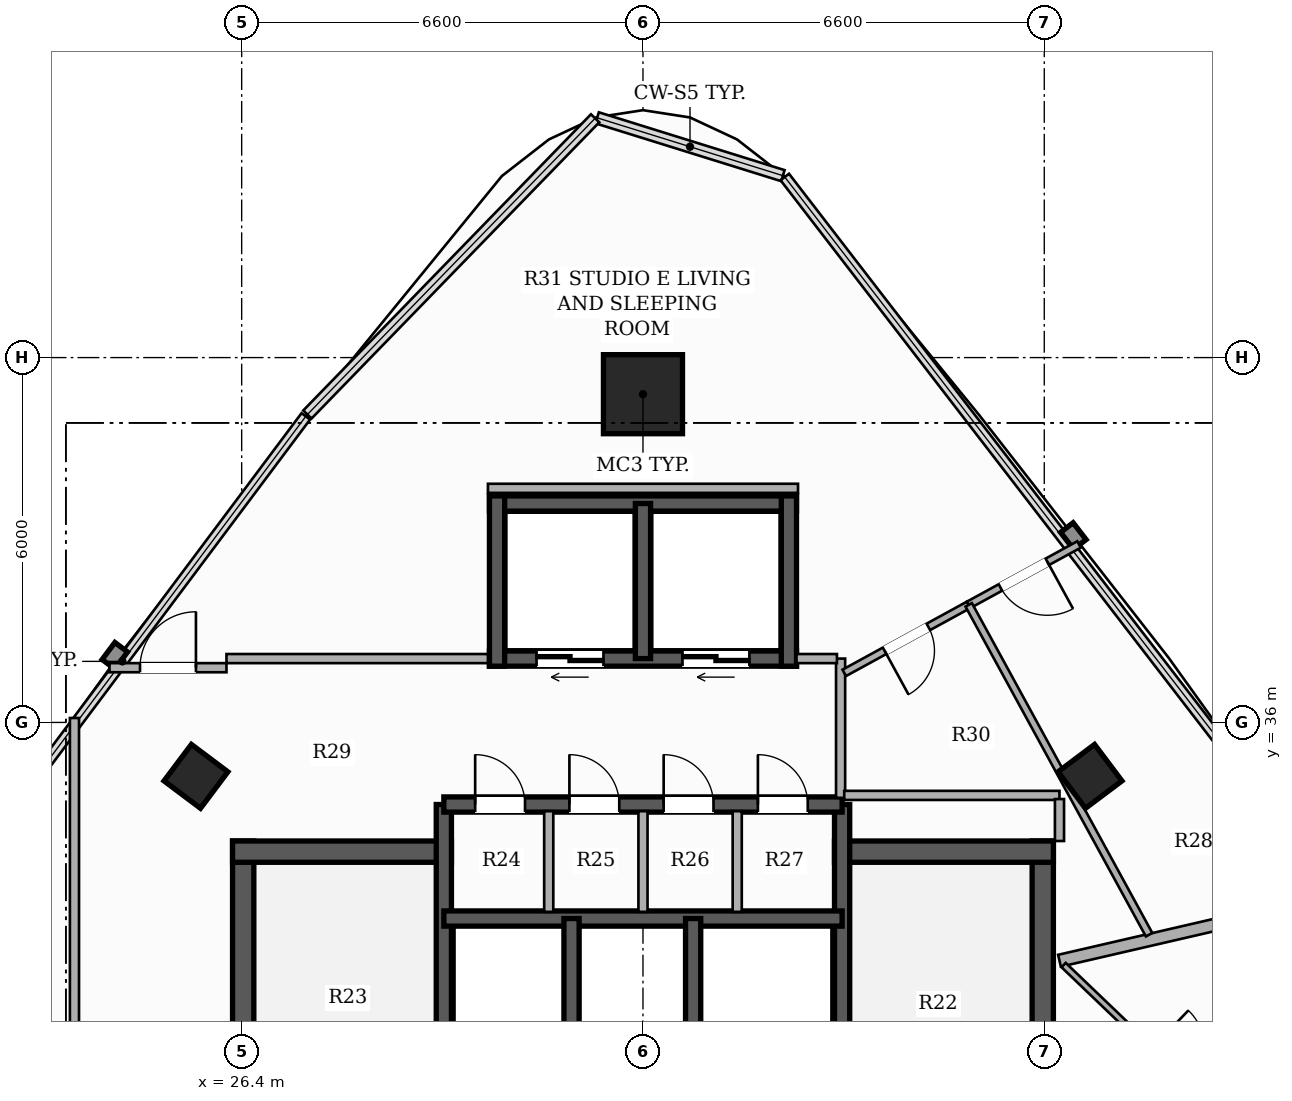
"""IFC4 building model, lengths in metres.
Left out: names, types, materials, properties, quantities, classifications, styles, units other than length and angle.
Written with IfcOpenShell. Run it as: python <this file> out.ifc"""

import sys

from ifc_helpers import new_model, si_unit, direction, frame, frame_2d, origin, origin_2d, place, context, subcontext, project, spatial, rectangle, hollow_rectangle, extrude, element, fill, save


model = new_model("IFC4")
c1 = context("Model", 3, precision=1e-05, world=origin(), true_north=direction((0.0, 1.0)))
c2 = subcontext(c1, "Body", "Model", "MODEL_VIEW")
j1 = project(units=[si_unit("LENGTHUNIT", "METRE"), si_unit("PLANEANGLEUNIT", "RADIAN")], contexts=[c1])
p1 = place(None, origin())
s1 = spatial("IfcSite", under=j1, at=p1, CompositionType="ELEMENT")
p2 = place(p1, origin())
s2 = spatial("IfcBuilding", under=s1, at=p2, CompositionType="ELEMENT")
p3 = place(p2, frame((0.0, 0.0, 216.2)))
s3 = spatial("IfcBuildingStorey", under=s2, at=p3, CompositionType="ELEMENT", Elevation=216.2)
p4 = place(p3, frame((26.425, 26.55, 0.0), z_axis=(0.0, 0.0, 1.0), x_axis=(0.0, 1.0, 0.0)))
e1 = element("IfcWall", 1, at=p4, inside=s3, PredefinedType="SHEAR", context=c2, shape_type="SweptSolid", body=[
    extrude(rectangle(XDim=7.5, YDim=0.35, at=frame_2d((3.75, 0.0))), origin(), (0.0, 0.0, 1.0), 3.3),
])
p5 = place(p3, frame((26.25, 33.875, 0.0), z_axis=(0.0, 0.0, 1.0), x_axis=(1.0, 0.0, 0.0)))
e2 = element("IfcWall", 2, at=p5, inside=s3, PredefinedType="SHEAR", context=c2, shape_type="SweptSolid", body=[
    extrude(rectangle(XDim=3.6, YDim=0.35, at=frame_2d((1.8, 0.0))), origin(), (0.0, 0.0, 1.0), 3.3),
])
p6 = place(p3, frame((39.575, 26.55, 0.0), z_axis=(0.0, 0.0, 1.0), x_axis=(0.0, 1.0, 0.0)))
e3 = element("IfcWall", 3, at=p6, inside=s3, PredefinedType="SHEAR", context=c2, shape_type="SweptSolid", body=[
    extrude(rectangle(XDim=7.5, YDim=0.35, at=frame_2d((3.75, 0.0))), origin(), (0.0, 0.0, 1.0), 3.3),
])
p7 = place(p3, frame((36.15, 33.875, 0.0), z_axis=(0.0, 0.0, 1.0), x_axis=(1.0, 0.0, 0.0)))
e4 = element("IfcWall", 4, at=p7, inside=s3, PredefinedType="SHEAR", context=c2, shape_type="SweptSolid", body=[
    extrude(rectangle(XDim=3.6, YDim=0.35, at=frame_2d((1.8, 0.0))), origin(), (0.0, 0.0, 1.0), 3.3),
])
p8 = place(p3, frame((29.725, 26.55, 0.0), z_axis=(0.0, 0.0, 1.0), x_axis=(0.0, 1.0, 0.0)))
e5 = element("IfcWall", 5, at=p8, inside=s3, PredefinedType="SHEAR", context=c2, shape_type="SweptSolid", body=[
    extrude(rectangle(XDim=8.1, YDim=0.25, at=frame_2d((4.05, 0.0))), origin(), (0.0, 0.0, 1.0), 3.3),
])
p9 = place(p8, frame((0.6, 0.0, 0.0)))
e6 = element("IfcOpeningElement", 6, at=p9, cuts=e5, PredefinedType="OPENING", context=c2, shape_type="SweptSolid", body=[
    extrude(rectangle(XDim=1.05, YDim=2.15, at=frame_2d((0.525, 1.075))), frame((0.0, 0.135, 0.0), z_axis=(0.0, -1.0, 0.0), x_axis=(1.0, 0.0, 0.0)), (0.0, 0.0, 1.0), 0.27),
])
p10 = place(p3, frame((36.275, 26.55, 0.0), z_axis=(0.0, 0.0, 1.0), x_axis=(0.0, 1.0, 0.0)))
e7 = element("IfcWall", 7, at=p10, inside=s3, PredefinedType="SHEAR", context=c2, shape_type="SweptSolid", body=[
    extrude(rectangle(XDim=8.1, YDim=0.25, at=frame_2d((4.05, 0.0))), origin(), (0.0, 0.0, 1.0), 3.3),
])
p11 = place(p10, frame((0.6, 0.0, 0.0)))
e8 = element("IfcOpeningElement", 8, at=p11, cuts=e7, PredefinedType="OPENING", context=c2, shape_type="SweptSolid", body=[
    extrude(rectangle(XDim=1.05, YDim=2.15, at=frame_2d((0.525, 1.075))), frame((0.0, 0.135, 0.0), z_axis=(0.0, -1.0, 0.0), x_axis=(1.0, 0.0, 0.0)), (0.0, 0.0, 1.0), 0.27),
])
p12 = place(p3, frame((29.725, 32.775, 0.0), z_axis=(0.0, 0.0, 1.0), x_axis=(1.0, 0.0, 0.0)))
e9 = element("IfcWall", 9, at=p12, inside=s3, PredefinedType="SHEAR", context=c2, shape_type="SweptSolid", body=[
    extrude(rectangle(XDim=6.55, YDim=0.25, at=frame_2d((3.275, 0.0))), origin(), (0.0, 0.0, 1.0), 3.3),
])
for number, where, z_axis, x_axis in (
    (10, (31.825, 29.875, 0.0), (0.0, 0.0, 1.0), (0.0, 1.0, 0.0)),
    (11, (33.825, 29.875, 0.0), (0.0, 0.0, 1.0), (0.0, 1.0, 0.0)),
):
    element("IfcWall", number, at=place(p3, frame(where, z_axis=z_axis, x_axis=x_axis)), inside=s3, PredefinedType="SHEAR", context=c2, shape_type="SweptSolid", body=[
        extrude(rectangle(XDim=2.9, YDim=0.25, at=frame_2d((1.45, 0.0))), origin(), (0.0, 0.0, 1.0), 3.3),
    ])
p13 = place(p3, frame((29.725, 34.65, 0.0), z_axis=(0.0, 0.0, 1.0), x_axis=(1.0, 0.0, 0.0)))
e12 = element("IfcWall", 12, at=p13, inside=s3, PredefinedType="SHEAR", context=c2, shape_type="SweptSolid", body=[
    extrude(rectangle(XDim=6.55, YDim=0.25, at=frame_2d((3.275, 0.0))), origin(), (0.0, 0.0, 1.0), 3.3),
])
p14 = place(p13, frame((0.515, 0.0, 0.0)))
e13 = element("IfcOpeningElement", 13, at=p14, cuts=e12, PredefinedType="OPENING", context=c2, shape_type="SweptSolid", body=[
    extrude(rectangle(XDim=0.82, YDim=2.1, at=frame_2d((0.41, 1.05))), frame((0.0, 0.135, 0.0), z_axis=(0.0, -1.0, 0.0), x_axis=(1.0, 0.0, 0.0)), (0.0, 0.0, 1.0), 0.27),
])
p15 = place(p13, frame((2.065, 0.0, 0.0)))
e14 = element("IfcOpeningElement", 14, at=p15, cuts=e12, PredefinedType="OPENING", context=c2, shape_type="SweptSolid", body=[
    extrude(rectangle(XDim=0.82, YDim=2.1, at=frame_2d((0.41, 1.05))), frame((0.0, 0.135, 0.0), z_axis=(0.0, -1.0, 0.0), x_axis=(1.0, 0.0, 0.0)), (0.0, 0.0, 1.0), 0.27),
])
p16 = place(p13, frame((3.615, 0.0, 0.0)))
e15 = element("IfcOpeningElement", 15, at=p16, cuts=e12, PredefinedType="OPENING", context=c2, shape_type="SweptSolid", body=[
    extrude(rectangle(XDim=0.82, YDim=2.1, at=frame_2d((0.41, 1.05))), frame((0.0, 0.135, 0.0), z_axis=(0.0, -1.0, 0.0), x_axis=(1.0, 0.0, 0.0)), (0.0, 0.0, 1.0), 0.27),
])
p17 = place(p13, frame((5.165, 0.0, 0.0)))
e16 = element("IfcOpeningElement", 16, at=p17, cuts=e12, PredefinedType="OPENING", context=c2, shape_type="SweptSolid", body=[
    extrude(rectangle(XDim=0.82, YDim=2.1, at=frame_2d((0.41, 1.05))), frame((0.0, 0.135, 0.0), z_axis=(0.0, -1.0, 0.0), x_axis=(1.0, 0.0, 0.0)), (0.0, 0.0, 1.0), 0.27),
])
p18 = place(p3, frame((35.525, 37.05, 0.0), z_axis=(0.0, 0.0, 1.0), x_axis=(-1.0, 0.0, 0.0)))
e17 = element("IfcWall", 17, at=p18, inside=s3, PredefinedType="SHEAR", context=c2, shape_type="SweptSolid", body=[
    extrude(rectangle(XDim=5.05, YDim=0.25, at=frame_2d((2.525, 0.0))), origin(), (0.0, 0.0, 1.0), 3.3),
])
p19 = place(p18, frame((3.175, 0.0, 0.0)))
e18 = element("IfcOpeningElement", 18, at=p19, cuts=e17, PredefinedType="OPENING", context=c2, shape_type="SweptSolid", body=[
    extrude(rectangle(XDim=1.1, YDim=2.2, at=frame_2d((0.55, 1.1))), frame((0.0, 0.135, 0.0), z_axis=(0.0, -1.0, 0.0), x_axis=(1.0, 0.0, 0.0)), (0.0, 0.0, 1.0), 0.27),
])
p20 = place(p18, frame((0.775, 0.0, 0.0)))
e19 = element("IfcOpeningElement", 19, at=p20, cuts=e17, PredefinedType="OPENING", context=c2, shape_type="SweptSolid", body=[
    extrude(rectangle(XDim=1.1, YDim=2.2, at=frame_2d((0.55, 1.1))), frame((0.0, 0.135, 0.0), z_axis=(0.0, -1.0, 0.0), x_axis=(1.0, 0.0, 0.0)), (0.0, 0.0, 1.0), 0.27),
])
p21 = place(p3, frame((30.475, 39.6, 0.0), z_axis=(0.0, 0.0, 1.0), x_axis=(1.0, 0.0, 0.0)))
e20 = element("IfcWall", 20, at=p21, inside=s3, PredefinedType="SHEAR", context=c2, shape_type="SweptSolid", body=[
    extrude(rectangle(XDim=5.05, YDim=0.25, at=frame_2d((2.525, 0.0))), origin(), (0.0, 0.0, 1.0), 3.3),
])
for number, where, z_axis, x_axis in (
    (21, (30.6, 36.925, 0.0), (0.0, 0.0, 1.0), (0.0, 1.0, 0.0)),
    (22, (35.4, 36.925, 0.0), (0.0, 0.0, 1.0), (0.0, 1.0, 0.0)),
):
    element("IfcWall", number, at=place(p3, frame(where, z_axis=z_axis, x_axis=x_axis)), inside=s3, PredefinedType="SHEAR", context=c2, shape_type="SweptSolid", body=[
        extrude(rectangle(XDim=2.8, YDim=0.25, at=frame_2d((1.4, 0.0))), origin(), (0.0, 0.0, 1.0), 3.3),
    ])
p22 = place(p3, frame((33.0, 37.05, 0.0), z_axis=(0.0, 0.0, 1.0), x_axis=(0.0, 1.0, 0.0)))
e23 = element("IfcWall", 23, at=p22, inside=s3, PredefinedType="SHEAR", context=c2, shape_type="SweptSolid", body=[
    extrude(rectangle(XDim=2.55, YDim=0.25, at=frame_2d((1.275, 0.0))), origin(), (0.0, 0.0, 1.0), 3.3),
])
p23 = place(p3, frame((33.0, 41.398, 0.0), z_axis=(0.0, 0.0, 1.0), x_axis=(1.0, 0.0, 0.0)))
e24 = element("IfcColumn", 24, at=p23, inside=s3, PredefinedType="COLUMN", context=c2, shape_type="SweptSolid", body=[
    extrude(hollow_rectangle(XDim=1.3, YDim=1.3, WallThickness=0.04, at=origin_2d()), origin(), (0.0, 0.0, 1.0), 3.3),
])
for number, where, z_axis, x_axis in (
    (25, (25.648, 35.113, 0.0), (0.0, 0.0, 1.0), (0.6, 0.8, 0.0)),
    (26, (40.352, 35.113, 0.0), (0.0, 0.0, 1.0), (-0.6, 0.8, 0.0)),
):
    element("IfcColumn", number, at=place(p3, frame(where, z_axis=z_axis, x_axis=x_axis)), inside=s3, PredefinedType="COLUMN", context=c2, shape_type="SweptSolid", body=[
        extrude(hollow_rectangle(XDim=0.75, YDim=0.75, WallThickness=0.025, at=origin_2d()), origin(), (0.0, 0.0, 1.0), 3.3),
    ])
p24 = place(p3, frame((36.25, 34.76, 0.0), z_axis=(0.0, 0.0, 1.0), x_axis=(0.0, 1.0, 0.0)))
e27 = element("IfcWall", 27, at=p24, inside=s3, PredefinedType="PARTITIONING", context=c2, shape_type="SweptSolid", body=[
    extrude(rectangle(XDim=2.29, YDim=0.15, at=frame_2d((1.145, 0.0))), origin(), (0.0, 0.0, 1.0), 2.425),
])
p25 = place(p3, frame((35.525, 37.05, 0.0), z_axis=(0.0, 0.0, 1.0), x_axis=(1.0, 0.0, 0.0)))
e28 = element("IfcWall", 28, at=p25, inside=s3, PredefinedType="PARTITIONING", context=c2, shape_type="SweptSolid", body=[
    extrude(rectangle(XDim=0.665, YDim=0.15, at=frame_2d((0.333, 0.0))), origin(), (0.0, 0.0, 1.0), 2.425),
])
for number, where, z_axis, x_axis in (
    (29, (31.45, 32.885, 0.0), (0.0, 0.0, 1.0), (0.0, 1.0, 0.0)),
    (30, (33.0, 32.885, 0.0), (0.0, 0.0, 1.0), (0.0, 1.0, 0.0)),
    (31, (34.55, 32.885, 0.0), (0.0, 0.0, 1.0), (0.0, 1.0, 0.0)),
):
    element("IfcWall", number, at=place(p3, frame(where, z_axis=z_axis, x_axis=x_axis)), inside=s3, PredefinedType="PARTITIONING", context=c2, shape_type="SweptSolid", body=[
        extrude(rectangle(XDim=1.655, YDim=0.15, at=frame_2d((0.828, 0.0))), origin(), (0.0, 0.0, 1.0), 3.06),
    ])
p26 = place(p3, frame((23.65, 23.91, 0.0), z_axis=(0.0, 0.0, 1.0), x_axis=(0.0, 1.0, 0.0)))
e32 = element("IfcWall", 32, at=p26, inside=s3, PredefinedType="PARTITIONING", context=c2, shape_type="SweptSolid", body=[
    extrude(rectangle(XDim=12.163, YDim=0.15, at=frame_2d((6.082, 0.0))), origin(), (0.0, 0.0, 1.0), 2.492),
])
p27 = place(p26, frame((5.622, 0.0, 0.0)))
e33 = element("IfcOpeningElement", 33, at=p27, cuts=e32, PredefinedType="OPENING", context=c2, shape_type="SweptSolid", body=[
    extrude(rectangle(XDim=0.92, YDim=2.15, at=frame_2d((0.46, 1.075))), frame((0.0, 0.085, 0.0), z_axis=(0.0, -1.0, 0.0), x_axis=(1.0, 0.0, 0.0)), (0.0, 0.0, 1.0), 0.17),
])
p28 = place(p3, frame((24.226, 36.9, 0.0), z_axis=(0.0, 0.0, 1.0), x_axis=(1.0, 0.0, 0.0)))
e34 = element("IfcWall", 34, at=p28, inside=s3, PredefinedType="PARTITIONING", context=c2, shape_type="SweptSolid", body=[
    extrude(rectangle(XDim=1.924, YDim=0.15, at=frame_2d((0.962, 0.0))), origin(), (0.0, 0.0, 1.0), 2.619),
])
p29 = place(p28, frame((0.502, 0.0, 0.0)))
e35 = element("IfcOpeningElement", 35, at=p29, cuts=e34, PredefinedType="OPENING", context=c2, shape_type="SweptSolid", body=[
    extrude(rectangle(XDim=0.92, YDim=2.15, at=frame_2d((0.46, 1.075))), frame((0.0, 0.085, 0.0), z_axis=(0.0, -1.0, 0.0), x_axis=(1.0, 0.0, 0.0)), (0.0, 0.0, 1.0), 0.17),
])
p30 = place(p3, frame((26.15, 37.05, 0.0), z_axis=(0.0, 0.0, 1.0), x_axis=(1.0, 0.0, 0.0)))
e36 = element("IfcWall", 36, at=p30, inside=s3, PredefinedType="PARTITIONING", context=c2, shape_type="SweptSolid", body=[
    extrude(rectangle(XDim=4.3, YDim=0.15, at=frame_2d((2.15, 0.0))), origin(), (0.0, 0.0, 1.0), 2.425),
])
p31 = place(p3, frame((30.45, 39.85, 0.0), z_axis=(0.0, 0.0, 1.0), x_axis=(1.0, 0.0, 0.0)))
e37 = element("IfcWall", 37, at=p31, inside=s3, PredefinedType="PARTITIONING", context=c2, shape_type="SweptSolid", body=[
    extrude(rectangle(XDim=5.1, YDim=0.15, at=frame_2d((2.55, 0.0))), origin(), (0.0, 0.0, 1.0), 2.492),
])
p32 = place(p3, frame((36.31, 34.8, 0.0), z_axis=(0.0, 0.0, 1.0), x_axis=(1.0, 0.0, 0.0)))
e38 = element("IfcWall", 38, at=p32, inside=s3, PredefinedType="PARTITIONING", context=c2, shape_type="SweptSolid", body=[
    extrude(rectangle(XDim=3.54, YDim=0.15, at=frame_2d((1.77, 0.0))), origin(), (0.0, 0.0, 1.0), 2.425),
])
p33 = place(p3, frame((39.85, 34.74, 0.0), z_axis=(0.0, 0.0, 1.0), x_axis=(0.0, -1.0, 0.0)))
e39 = element("IfcWall", 39, at=p33, inside=s3, PredefinedType="PARTITIONING", context=c2, shape_type="SweptSolid", body=[
    extrude(rectangle(XDim=0.69, YDim=0.15, at=frame_2d((0.345, 0.0))), origin(), (0.0, 0.0, 1.0), 2.773),
])
p34 = place(p3, frame((39.85, 32.081, 0.0), z_axis=(0.0, 0.0, 1.0), x_axis=(0.974339670333, 0.225082666628, 0.0)))
e40 = element("IfcWall", 40, at=p34, inside=s3, PredefinedType="PARTITIONING", context=c2, shape_type="SweptSolid", body=[
    extrude(rectangle(XDim=4.714, YDim=0.2, at=frame_2d((2.357, 0.0))), origin(), (0.0, 0.0, 1.0), 2.492),
])
p35 = place(p3, frame((39.918, 32.01, 0.0), z_axis=(0.0, 0.0, 1.0), x_axis=(0.722311203135, -0.691568164266, 0.0)))
e41 = element("IfcWall", 41, at=p35, inside=s3, PredefinedType="PARTITIONING", context=c2, shape_type="SweptSolid", body=[
    extrude(rectangle(XDim=4.876, YDim=0.1, at=frame_2d((2.438, 0.0))), origin(), (0.0, 0.0, 1.0), 2.773),
])
p36 = place(p35, frame((1.998, 0.0, 0.0)))
e42 = element("IfcOpeningElement", 42, at=p36, cuts=e41, PredefinedType="OPENING", context=c2, shape_type="SweptSolid", body=[
    extrude(rectangle(XDim=0.88, YDim=2.1, at=frame_2d((0.44, 1.05))), frame((0.0, 0.06, 0.0), z_axis=(0.0, -1.0, 0.0), x_axis=(1.0, 0.0, 0.0)), (0.0, 0.0, 1.0), 0.12),
])
p37 = place(p3, frame((38.357, 37.934, 0.0), z_axis=(0.0, 0.0, 1.0), x_axis=(-0.877415192217, -0.479731779714, 0.0)))
e43 = element("IfcWall", 43, at=p37, inside=s3, PredefinedType="PARTITIONING", context=c2, shape_type="SweptSolid", body=[
    extrude(rectangle(XDim=2.333, YDim=0.12, at=frame_2d((1.167, 0.0))), origin(), (0.0, 0.0, 1.0), 2.425),
])
p38 = place(p37, frame((0.756, 0.0, 0.0)))
e44 = element("IfcOpeningElement", 44, at=p38, cuts=e43, PredefinedType="OPENING", context=c2, shape_type="SweptSolid", body=[
    extrude(rectangle(XDim=0.82, YDim=2.1, at=frame_2d((0.41, 1.05))), frame((0.0, 0.07, 0.0), z_axis=(0.0, -1.0, 0.0), x_axis=(1.0, 0.0, 0.0)), (0.0, 0.0, 1.0), 0.14),
])
p39 = place(p3, frame((40.172, 38.927, 0.0), z_axis=(0.0, 0.0, 1.0), x_axis=(-0.877322236726, -0.479901753432, 0.0)))
e45 = element("IfcWall", 45, at=p39, inside=s3, PredefinedType="PARTITIONING", context=c2, shape_type="SweptSolid", body=[
    extrude(rectangle(XDim=2.069, YDim=0.12, at=frame_2d((1.035, 0.0))), origin(), (0.0, 0.0, 1.0), 3.06),
])
p40 = place(p39, frame((0.594, 0.0, 0.0)))
e46 = element("IfcOpeningElement", 46, at=p40, cuts=e45, PredefinedType="OPENING", context=c2, shape_type="SweptSolid", body=[
    extrude(rectangle(XDim=0.88, YDim=2.1, at=frame_2d((0.44, 1.05))), frame((0.0, 0.07, 0.0), z_axis=(0.0, -1.0, 0.0), x_axis=(1.0, 0.0, 0.0)), (0.0, 0.0, 1.0), 0.14),
])
p41 = place(p3, frame((38.357, 37.934, 0.0), z_axis=(0.0, 0.0, 1.0), x_axis=(0.479839410825, -0.877356335715, 0.0)))
e47 = element("IfcWall", 47, at=p41, inside=s3, PredefinedType="PARTITIONING", context=c2, shape_type="SweptSolid", body=[
    extrude(rectangle(XDim=6.183, YDim=0.12, at=frame_2d((3.092, 0.0))), origin(), (0.0, 0.0, 1.0), 2.492),
])
p42 = place(p19, origin())
e48 = element("IfcDoor", 48, at=p42, inside=s3, OperationType="DOUBLE_DOOR_SLIDING", PredefinedType="DOOR", context=c2, shape_type="SweptSolid", body=[
    extrude(rectangle(XDim=1.1, YDim=2.2, at=frame_2d((0.55, 1.1))), frame((0.0, 0.025, 0.0), z_axis=(0.0, -1.0, 0.0), x_axis=(1.0, 0.0, 0.0)), (0.0, 0.0, 1.0), 0.05),
])
fill(e18, e48)
p43 = place(p20, origin())
e49 = element("IfcDoor", 49, at=p43, inside=s3, OperationType="DOUBLE_DOOR_SLIDING", PredefinedType="DOOR", context=c2, shape_type="SweptSolid", body=[
    extrude(rectangle(XDim=1.1, YDim=2.2, at=frame_2d((0.55, 1.1))), frame((0.0, 0.025, 0.0), z_axis=(0.0, -1.0, 0.0), x_axis=(1.0, 0.0, 0.0)), (0.0, 0.0, 1.0), 0.05),
])
fill(e19, e49)
p44 = place(p14, origin())
e50 = element("IfcDoor", 50, at=p44, inside=s3, OperationType="SINGLE_SWING_LEFT", PredefinedType="DOOR", context=c2, shape_type="SweptSolid", body=[
    extrude(rectangle(XDim=0.82, YDim=2.1, at=frame_2d((0.41, 1.05))), frame((0.0, 0.025, 0.0), z_axis=(0.0, -1.0, 0.0), x_axis=(1.0, 0.0, 0.0)), (0.0, 0.0, 1.0), 0.05),
])
fill(e13, e50)
p45 = place(p15, origin())
e51 = element("IfcDoor", 51, at=p45, inside=s3, OperationType="SINGLE_SWING_LEFT", PredefinedType="DOOR", context=c2, shape_type="SweptSolid", body=[
    extrude(rectangle(XDim=0.82, YDim=2.1, at=frame_2d((0.41, 1.05))), frame((0.0, 0.025, 0.0), z_axis=(0.0, -1.0, 0.0), x_axis=(1.0, 0.0, 0.0)), (0.0, 0.0, 1.0), 0.05),
])
fill(e14, e51)
p46 = place(p16, origin())
e52 = element("IfcDoor", 52, at=p46, inside=s3, OperationType="SINGLE_SWING_LEFT", PredefinedType="DOOR", context=c2, shape_type="SweptSolid", body=[
    extrude(rectangle(XDim=0.82, YDim=2.1, at=frame_2d((0.41, 1.05))), frame((0.0, 0.025, 0.0), z_axis=(0.0, -1.0, 0.0), x_axis=(1.0, 0.0, 0.0)), (0.0, 0.0, 1.0), 0.05),
])
fill(e15, e52)
p47 = place(p17, origin())
e53 = element("IfcDoor", 53, at=p47, inside=s3, OperationType="SINGLE_SWING_LEFT", PredefinedType="DOOR", context=c2, shape_type="SweptSolid", body=[
    extrude(rectangle(XDim=0.82, YDim=2.1, at=frame_2d((0.41, 1.05))), frame((0.0, 0.025, 0.0), z_axis=(0.0, -1.0, 0.0), x_axis=(1.0, 0.0, 0.0)), (0.0, 0.0, 1.0), 0.05),
])
fill(e16, e53)
p48 = place(p29, origin())
e54 = element("IfcDoor", 54, at=p48, inside=s3, OperationType="SINGLE_SWING_RIGHT", PredefinedType="DOOR", context=c2, shape_type="SweptSolid", body=[
    extrude(rectangle(XDim=0.92, YDim=2.15, at=frame_2d((0.46, 1.075))), frame((0.0, 0.025, 0.0), z_axis=(0.0, -1.0, 0.0), x_axis=(1.0, 0.0, 0.0)), (0.0, 0.0, 1.0), 0.05),
])
fill(e35, e54)
p49 = place(p38, origin())
e55 = element("IfcDoor", 55, at=p49, inside=s3, OperationType="SINGLE_SWING_RIGHT", PredefinedType="DOOR", context=c2, shape_type="SweptSolid", body=[
    extrude(rectangle(XDim=0.82, YDim=2.1, at=frame_2d((0.41, 1.05))), frame((0.0, 0.025, 0.0), z_axis=(0.0, -1.0, 0.0), x_axis=(1.0, 0.0, 0.0)), (0.0, 0.0, 1.0), 0.05),
])
fill(e44, e55)
p50 = place(p40, origin())
e56 = element("IfcDoor", 56, at=p50, inside=s3, OperationType="SINGLE_SWING_LEFT", PredefinedType="DOOR", context=c2, shape_type="SweptSolid", body=[
    extrude(rectangle(XDim=0.88, YDim=2.1, at=frame_2d((0.44, 1.05))), frame((0.0, 0.025, 0.0), z_axis=(0.0, -1.0, 0.0), x_axis=(1.0, 0.0, 0.0)), (0.0, 0.0, 1.0), 0.05),
])
fill(e46, e56)
save(model, sys.argv[1])
